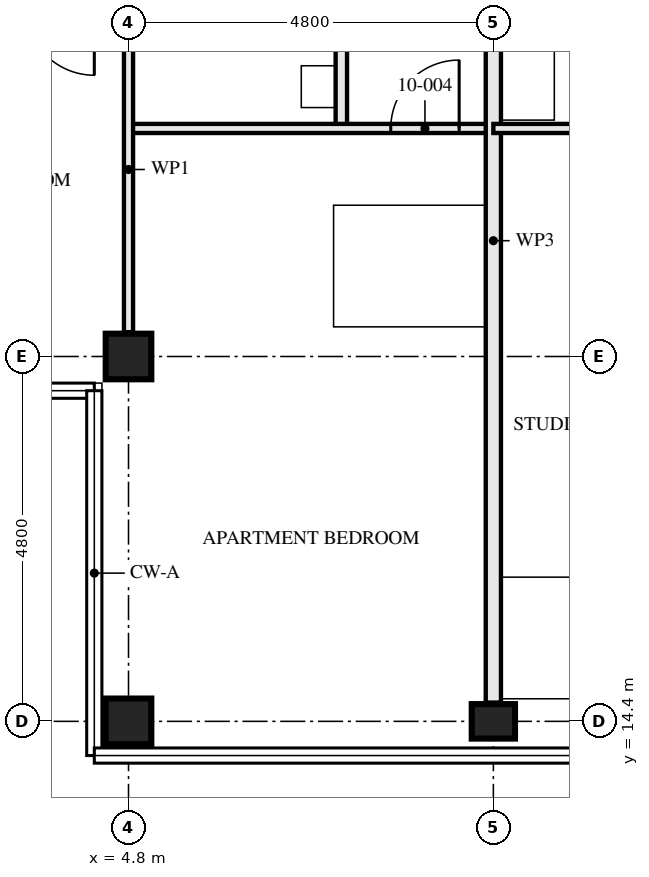
"""IFC4 building model, lengths in metres.
Left out: names, types, materials, properties, quantities, classifications, styles, units other than length and angle.
Written with IfcOpenShell. Run it as: python <this file> out.ifc"""

import sys

from ifc_helpers import new_model, si_unit, direction, frame, frame_2d, origin, origin_2d, place, context, subcontext, project, spatial, rectangle, hollow_rectangle, i_section, extrude, element, fill, save


model = new_model("IFC4")
c1 = context("Model", 3, precision=1e-05, world=origin(), true_north=direction((0.0, 1.0)))
c2 = subcontext(c1, "Body", "Model", "MODEL_VIEW")
j1 = project(units=[si_unit("LENGTHUNIT", "METRE"), si_unit("PLANEANGLEUNIT", "RADIAN")], contexts=[c1])
p1 = place(None, origin())
s1 = spatial("IfcSite", under=j1, at=p1, CompositionType="ELEMENT")
p2 = place(p1, origin())
s2 = spatial("IfcBuilding", under=s1, at=p2, CompositionType="ELEMENT")
p3 = place(p2, frame((0.0, 0.0, 41.0)))
s3 = spatial("IfcBuildingStorey", under=s2, at=p3, CompositionType="ELEMENT", Elevation=41.0)
for number, where, z_axis, x_axis in (
    (1, (4.8, 14.4, 0.0), (0.0, 0.0, 1.0), (0.0, 1.0, 0.0)),
    (2, (4.8, 19.2, 0.0), (0.0, 0.0, 1.0), (0.0, 1.0, 0.0)),
):
    element("IfcColumn", number, at=place(p3, frame(where, z_axis=z_axis, x_axis=x_axis)), inside=s3, PredefinedType="COLUMN", context=c2, shape_type="SweptSolid", body=[
        extrude(hollow_rectangle(XDim=0.6, YDim=0.6, WallThickness=0.05, at=origin_2d()), origin(), (0.0, 0.0, 1.0), 3.5),
    ])
p4 = place(p3, frame((9.6, 14.4, 0.0), z_axis=(0.0, 0.0, 1.0), x_axis=(0.0, 1.0, 0.0)))
e3 = element("IfcColumn", 3, at=p4, inside=s3, PredefinedType="COLUMN", context=c2, shape_type="SweptSolid", body=[
    extrude(i_section(OverallWidth=0.454, OverallDepth=0.569, WebThickness=0.078, FlangeThickness=0.125, FilletRadius=0.015, at=origin_2d()), origin(), (0.0, 0.0, 1.0), 3.5),
])
p5 = place(p3, frame((7.6, 22.2, 0.0), z_axis=(0.0, 0.0, 1.0), x_axis=(0.0, 1.0, 0.0)))
e4 = element("IfcWall", 4, at=p5, inside=s3, PredefinedType="PARTITIONING", context=c2, shape_type="SweptSolid", body=[
    extrude(rectangle(XDim=3.0, YDim=0.15, at=frame_2d((1.5, 0.0))), origin(), (0.0, 0.0, 1.0), 2.55),
])
p6 = place(p5, frame((1.05, 0.0, 0.0)))
e5 = element("IfcOpeningElement", 5, at=p6, cuts=e4, PredefinedType="OPENING", context=c2, shape_type="SweptSolid", body=[
    extrude(rectangle(XDim=0.9, YDim=2.1, at=frame_2d((0.45, 1.05))), frame((0.0, 0.085, 0.0), z_axis=(0.0, -1.0, 0.0), x_axis=(1.0, 0.0, 0.0)), (0.0, 0.0, 1.0), 0.171),
])
p7 = place(p3, frame((4.8, 22.2, 0.0), z_axis=(0.0, 0.0, 1.0), x_axis=(1.0, 0.0, 0.0)))
e6 = element("IfcWall", 6, at=p7, inside=s3, PredefinedType="PARTITIONING", context=c2, shape_type="SweptSolid", body=[
    extrude(rectangle(XDim=4.8, YDim=0.12, at=frame_2d((2.4, 0.0))), origin(), (0.0, 0.0, 1.0), 3.33),
])
p8 = place(p7, frame((3.45, 0.0, 0.0)))
e7 = element("IfcOpeningElement", 7, at=p8, cuts=e6, PredefinedType="OPENING", context=c2, shape_type="SweptSolid", body=[
    extrude(rectangle(XDim=0.9, YDim=2.1, at=frame_2d((0.45, 1.05))), frame((0.0, 0.071, 0.0), z_axis=(0.0, -1.0, 0.0), x_axis=(1.0, 0.0, 0.0)), (0.0, 0.0, 1.0), 0.141),
])
p9 = place(p3, frame((4.8, 19.52, 0.0), z_axis=(0.0, 0.0, 1.0), x_axis=(0.0, 1.0, 0.0)))
e8 = element("IfcWall", 8, at=p9, inside=s3, PredefinedType="PARTITIONING", context=c2, shape_type="SweptSolid", body=[
    extrude(rectangle(XDim=4.28, YDim=0.12, at=frame_2d((2.14, 0.0))), origin(), (0.0, 0.0, 1.0), 3.33),
])
p10 = place(p3, frame((9.6, 14.647, 0.0), z_axis=(0.0, 0.0, 1.0), x_axis=(0.0, 1.0, 0.0)))
e9 = element("IfcWall", 9, at=p10, inside=s3, PredefinedType="PARTITIONING", context=c2, shape_type="SweptSolid", body=[
    extrude(rectangle(XDim=12.153, YDim=0.2, at=frame_2d((6.077, 0.0))), origin(), (0.0, 0.0, 1.0), 2.55),
])
p11 = place(p3, frame((9.6, 22.2, 0.0), z_axis=(0.0, 0.0, 1.0), x_axis=(1.0, 0.0, 0.0)))
e10 = element("IfcWall", 10, at=p11, inside=s3, PredefinedType="PARTITIONING", context=c2, shape_type="SweptSolid", body=[
    extrude(rectangle(XDim=4.8, YDim=0.12, at=frame_2d((2.4, 0.0))), origin(), (0.0, 0.0, 1.0), 3.33),
])
p12 = place(p11, frame((3.45, 0.0, 0.0)))
e11 = element("IfcOpeningElement", 11, at=p12, cuts=e10, PredefinedType="OPENING", context=c2, shape_type="SweptSolid", body=[
    extrude(rectangle(XDim=0.9, YDim=2.1, at=frame_2d((0.45, 1.05))), frame((0.0, 0.071, 0.0), z_axis=(0.0, -1.0, 0.0), x_axis=(1.0, 0.0, 0.0)), (0.0, 0.0, 1.0), 0.141),
])
p13 = place(p8, origin())
e12 = element("IfcDoor", 12, at=p13, inside=s3, OperationType="SINGLE_SWING_LEFT", PredefinedType="DOOR", context=c2, shape_type="SweptSolid", body=[
    extrude(rectangle(XDim=0.9, YDim=2.1, at=frame_2d((0.45, 1.05))), frame((0.0, 0.022, 0.0), z_axis=(0.0, -1.0, 0.0), x_axis=(1.0, 0.0, 0.0)), (0.0, 0.0, 1.0), 0.044),
])
fill(e7, e12)
save(model, sys.argv[1])
